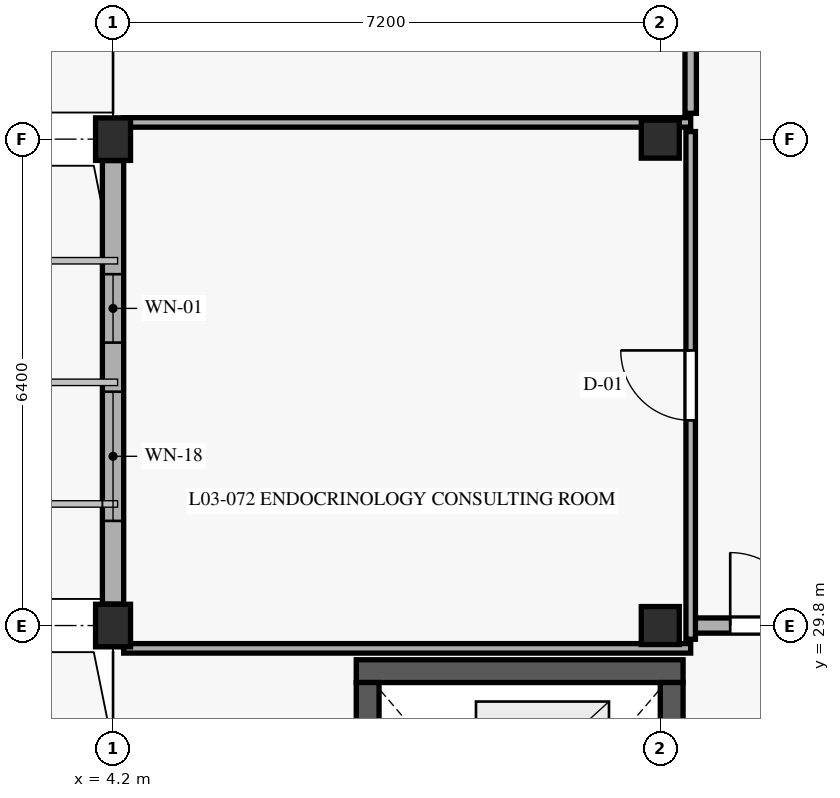
"""IFC4 building model, lengths in metres.
Left out: names, types, materials, properties, quantities, classifications, styles, units other than length and angle.
Written with IfcOpenShell. Run it as: python <this file> out.ifc"""

import sys

from ifc_helpers import new_model, si_unit, direction, frame, frame_2d, origin, origin_with_axes, origin_2d, place, context, subcontext, project, spatial, rectangle, extrude, element, fill, save


model = new_model("IFC4")
c1 = context("Model", 3, precision=1e-05, world=origin(), true_north=direction((0.0, 1.0)))
c2 = subcontext(c1, "Body", "Model", "MODEL_VIEW")
j1 = project(units=[si_unit("LENGTHUNIT", "METRE"), si_unit("PLANEANGLEUNIT", "RADIAN")], contexts=[c1])
p1 = place(None, origin())
s1 = spatial("IfcSite", under=j1, at=p1, CompositionType="ELEMENT")
p2 = place(p1, origin())
s2 = spatial("IfcBuilding", under=s1, at=p2, CompositionType="ELEMENT")
p3 = place(p2, frame((0.0, 0.0, 9.3)))
s3 = spatial("IfcBuildingStorey", under=s2, at=p3, CompositionType="ELEMENT", Elevation=9.3)
for number, where, z_axis, x_axis in (
    (1, (4.2, 29.8, 0.0), (0.0, 0.0, 1.0), (1.0, 0.0, 0.0)),
    (2, (4.2, 36.2, 0.0), (0.0, 0.0, 1.0), (1.0, 0.0, 0.0)),
):
    element("IfcColumn", number, at=place(p3, frame(where, z_axis=z_axis, x_axis=x_axis)), inside=s3, PredefinedType="COLUMN", context=c2, shape_type="SweptSolid", body=[
        extrude(rectangle(XDim=0.46, YDim=0.56, at=origin_2d()), origin(), (0.0, 0.0, 1.0), 4.2),
    ])
for number, where, z_axis, x_axis in (
    (3, (11.4, 29.8, 0.0), (0.0, 0.0, 1.0), (1.0, 0.0, 0.0)),
    (4, (11.4, 36.2, 0.0), (0.0, 0.0, 1.0), (1.0, 0.0, 0.0)),
):
    element("IfcColumn", number, at=place(p3, frame(where, z_axis=z_axis, x_axis=x_axis)), inside=s3, PredefinedType="COLUMN", context=c2, shape_type="SweptSolid", body=[
        extrude(rectangle(XDim=0.5, YDim=0.5, at=origin_2d()), origin(), (0.0, 0.0, 1.0), 4.2),
    ])
p4 = place(p3, frame((11.7, 29.2, 0.0), z_axis=(0.0, 0.0, 1.0), x_axis=(-1.0, 0.0, 0.0)))
e5 = element("IfcWall", 5, at=p4, inside=s3, PredefinedType="SHEAR", context=c2, shape_type="SweptSolid", body=[
    extrude(rectangle(XDim=4.3, YDim=0.3, at=frame_2d((2.15, 0.0))), origin(), (0.0, 0.0, 1.0), 3.9),
])
p5 = place(p3, frame((7.55, 29.05, 0.0), z_axis=(0.0, 0.0, 1.0), x_axis=(0.0, -1.0, 0.0)))
e6 = element("IfcWall", 6, at=p5, inside=s3, PredefinedType="SHEAR", context=c2, shape_type="SweptSolid", body=[
    extrude(rectangle(XDim=11.7, YDim=0.3, at=frame_2d((5.85, 0.0))), origin(), (0.0, 0.0, 1.0), 3.9),
])
p6 = place(p3, frame((11.55, 17.35, 0.0), z_axis=(0.0, 0.0, 1.0), x_axis=(0.0, 1.0, 0.0)))
e7 = element("IfcWall", 7, at=p6, inside=s3, PredefinedType="SHEAR", context=c2, shape_type="SweptSolid", body=[
    extrude(rectangle(XDim=11.7, YDim=0.3, at=frame_2d((5.85, 0.0))), origin(), (0.0, 0.0, 1.0), 3.9),
])
p7 = place(p6, frame((0.2, 0.0, 0.0)))
e8 = element("IfcOpeningElement", 8, at=p7, cuts=e7, PredefinedType="OPENING", context=c2, shape_type="SweptSolid", body=[
    extrude(rectangle(XDim=1.1, YDim=2.2, at=frame_2d((0.55, 1.1))), frame((0.0, 0.16, 0.0), z_axis=(0.0, -1.0, 0.0), x_axis=(1.0, 0.0, 0.0)), (0.0, 0.0, 1.0), 0.32),
])
p8 = place(p6, frame((7.875, 0.0, 0.0)))
e9 = element("IfcOpeningElement", 9, at=p8, cuts=e7, PredefinedType="OPENING", context=c2, shape_type="SweptSolid", body=[
    extrude(rectangle(XDim=1.15, YDim=2.2, at=frame_2d((0.575, 1.1))), frame((0.0, 0.16, 0.0), z_axis=(0.0, -1.0, 0.0), x_axis=(1.0, 0.0, 0.0)), (0.0, 0.0, 1.0), 0.32),
])
p9 = place(p6, frame((10.14, 0.0, 0.0)))
e10 = element("IfcOpeningElement", 10, at=p9, cuts=e7, PredefinedType="OPENING", context=c2, shape_type="SweptSolid", body=[
    extrude(rectangle(XDim=1.02, YDim=2.15, at=frame_2d((0.51, 1.075))), frame((0.0, 0.16, 0.0), z_axis=(0.0, -1.0, 0.0), x_axis=(1.0, 0.0, 0.0)), (0.0, 0.0, 1.0), 0.32),
])
p10 = place(p3, frame((4.2, 35.918, 0.0), z_axis=(0.0, 0.0, 1.0), x_axis=(0.0, -1.0, 0.0)))
e11 = element("IfcWall", 11, at=p10, inside=s3, PredefinedType="SOLIDWALL", context=c2, shape_type="SweptSolid", body=[
    extrude(rectangle(XDim=5.836, YDim=0.28, at=frame_2d((2.918, 0.0))), origin(), (0.0, 0.0, 1.0), 3.48),
])
p11 = place(p10, frame((1.495, 0.0, 0.88)))
e12 = element("IfcOpeningElement", 12, at=p11, cuts=e11, PredefinedType="OPENING", context=c2, shape_type="SweptSolid", body=[
    extrude(rectangle(XDim=0.9, YDim=2.2, at=frame_2d((0.45, 1.1))), frame((0.0, 0.15, 0.0), z_axis=(0.0, -1.0, 0.0), x_axis=(1.0, 0.0, 0.0)), (0.0, 0.0, 1.0), 0.3),
])
p12 = place(p10, frame((3.041, 0.0, 0.88)))
e13 = element("IfcOpeningElement", 13, at=p12, cuts=e11, PredefinedType="OPENING", context=c2, shape_type="SweptSolid", body=[
    extrude(rectangle(XDim=1.7, YDim=1.7, at=frame_2d((0.85, 0.85))), frame((0.0, 0.15, 0.0), z_axis=(0.0, -1.0, 0.0), x_axis=(1.0, 0.0, 0.0)), (0.0, 0.0, 1.0), 0.3),
])
p13 = place(p3, frame((11.85, 29.8, 0.0), z_axis=(0.0, 0.0, 1.0), x_axis=(1.0, 0.0, 0.0)))
e14 = element("IfcWall", 14, at=p13, inside=s3, PredefinedType="PARTITIONING", context=c2, shape_type="SweptSolid", body=[
    extrude(rectangle(XDim=2.65, YDim=0.2, at=frame_2d((1.325, 0.0))), origin(), (0.0, 0.0, 1.0), 3.495),
])
p14 = place(p13, frame((0.47, 0.0, 0.0)))
e15 = element("IfcOpeningElement", 15, at=p14, cuts=e14, PredefinedType="OPENING", context=c2, shape_type="SweptSolid", body=[
    extrude(rectangle(XDim=1.92, YDim=2.3, at=frame_2d((0.96, 1.15))), frame((0.0, 0.11, 0.0), z_axis=(0.0, -1.0, 0.0), x_axis=(1.0, 0.0, 0.0)), (0.0, 0.0, 1.0), 0.22),
])
p15 = place(p3, frame((11.8, 29.62, 0.0), z_axis=(0.0, 0.0, 1.0), x_axis=(0.0, 1.0, 0.0)))
e16 = element("IfcWall", 16, at=p15, inside=s3, PredefinedType="PARTITIONING", context=c2, shape_type="SweptSolid", body=[
    extrude(rectangle(XDim=6.68, YDim=0.125, at=frame_2d((3.34, 0.0))), origin(), (0.0, 0.0, 1.0), 3.495),
])
p16 = place(p15, frame((2.88, 0.0, 0.0)))
e17 = element("IfcOpeningElement", 17, at=p16, cuts=e16, PredefinedType="OPENING", context=c2, shape_type="SweptSolid", body=[
    extrude(rectangle(XDim=0.92, YDim=2.15, at=frame_2d((0.46, 1.075))), frame((0.0, 0.073, 0.0), z_axis=(0.0, -1.0, 0.0), x_axis=(1.0, 0.0, 0.0)), (0.0, 0.0, 1.0), 0.145),
])
for number, where, z_axis, x_axis in (
    (18, (4.34, 36.42, 0.0), (0.0, 0.0, 1.0), (1.0, 0.0, 0.0)),
    (19, (4.34, 29.5, 0.0), (0.0, 0.0, 1.0), (1.0, 0.0, 0.0)),
):
    element("IfcWall", number, at=place(p3, frame(where, z_axis=z_axis, x_axis=x_axis)), inside=s3, PredefinedType="PARTITIONING", context=c2, shape_type="SweptSolid", body=[
        extrude(rectangle(XDim=7.46, YDim=0.125, at=frame_2d((3.73, 0.0))), origin(), (0.0, 0.0, 1.0), 3.475),
    ])
p17 = place(p3, frame((11.8, 36.54, 0.0), z_axis=(0.0, 0.0, 1.0), x_axis=(0.0, 1.0, 0.0)))
e20 = element("IfcWall", 20, at=p17, inside=s3, PredefinedType="PARTITIONING", context=c2, shape_type="SweptSolid", body=[
    extrude(rectangle(XDim=5.27, YDim=0.15, at=frame_2d((2.635, 0.0))), origin(), (0.0, 0.0, 1.0), 3.895),
])
p18 = place(p17, frame((2.22, 0.0, 0.0)))
e21 = element("IfcOpeningElement", 21, at=p18, cuts=e20, PredefinedType="OPENING", context=c2, shape_type="SweptSolid", body=[
    extrude(rectangle(XDim=0.98, YDim=2.12, at=frame_2d((0.49, 1.06))), frame((0.0, 0.085, 0.0), z_axis=(0.0, -1.0, 0.0), x_axis=(1.0, 0.0, 0.0)), (0.0, 0.0, 1.0), 0.17),
])
p19 = place(p11, origin_with_axes())
e22 = element("IfcWindow", 22, at=p19, inside=s3, PartitioningType="SINGLE_PANEL", PredefinedType="WINDOW", context=c2, shape_type="SweptSolid", body=[
    extrude(rectangle(XDim=0.9, YDim=2.2, at=frame_2d((0.45, 1.1))), frame((0.0, 0.03, 0.0), z_axis=(0.0, -1.0, 0.0), x_axis=(1.0, 0.0, 0.0)), (0.0, 0.0, 1.0), 0.06),
])
fill(e12, e22)
p20 = place(p12, origin_with_axes())
e23 = element("IfcWindow", 23, at=p20, inside=s3, PartitioningType="SINGLE_PANEL", PredefinedType="WINDOW", context=c2, shape_type="SweptSolid", body=[
    extrude(rectangle(XDim=1.7, YDim=1.7, at=frame_2d((0.85, 0.85))), frame((0.0, 0.03, 0.0), z_axis=(0.0, -1.0, 0.0), x_axis=(1.0, 0.0, 0.0)), (0.0, 0.0, 1.0), 0.06),
])
fill(e13, e23)
p21 = place(p14, origin_with_axes())
e24 = element("IfcDoor", 24, at=p21, inside=s3, OperationType="DOUBLE_DOOR_DOUBLE_SWING", PredefinedType="DOOR", context=c2, shape_type="SweptSolid", body=[
    extrude(rectangle(XDim=1.92, YDim=2.3, at=frame_2d((0.96, 1.15))), frame((0.0, 0.025, 0.0), z_axis=(0.0, -1.0, 0.0), x_axis=(1.0, 0.0, 0.0)), (0.0, 0.0, 1.0), 0.05),
])
fill(e15, e24)
p22 = place(p16, origin_with_axes())
e25 = element("IfcDoor", 25, at=p22, inside=s3, OperationType="SINGLE_SWING_RIGHT", PredefinedType="DOOR", context=c2, shape_type="SweptSolid", body=[
    extrude(rectangle(XDim=0.92, YDim=2.15, at=frame_2d((0.46, 1.075))), frame((0.0, 0.025, 0.0), z_axis=(0.0, -1.0, 0.0), x_axis=(1.0, 0.0, 0.0)), (0.0, 0.0, 1.0), 0.05),
])
fill(e17, e25)
save(model, sys.argv[1])
